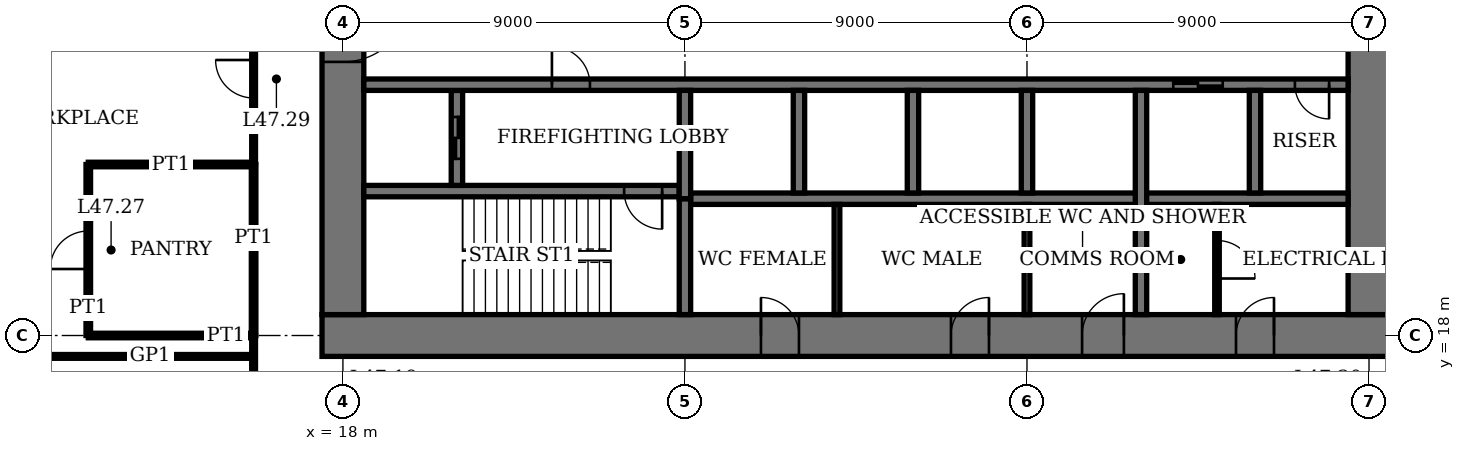
"""IFC4 building model, lengths in metres.
Left out: names, types, materials, properties, quantities, classifications, styles, units other than length and angle.
Written with IfcOpenShell. Run it as: python <this file> out.ifc"""

import sys

from ifc_helpers import new_model, si_unit, direction, frame, frame_2d, origin, place, context, subcontext, project, spatial, rectangle, extrude, element, fill, save


model = new_model("IFC4")
c1 = context("Model", 3, precision=1e-05, world=origin(), true_north=direction((0.0, 1.0)))
c2 = subcontext(c1, "Body", "Model", "MODEL_VIEW")
j1 = project(units=[si_unit("LENGTHUNIT", "METRE"), si_unit("PLANEANGLEUNIT", "RADIAN")], contexts=[c1])
p1 = place(None, origin())
s1 = spatial("IfcSite", under=j1, at=p1, CompositionType="ELEMENT")
p2 = place(p1, origin())
s2 = spatial("IfcBuilding", under=s1, at=p2, CompositionType="ELEMENT")
p3 = place(p2, frame((0.0, 0.0, 194.2)))
s3 = spatial("IfcBuildingStorey", under=s2, at=p3, CompositionType="ELEMENT", Elevation=194.2)
p4 = place(p3, frame((17.45, 18.0, 0.0), z_axis=(0.0, 0.0, 1.0), x_axis=(1.0, 0.0, 0.0)))
e1 = element("IfcWall", 1, at=p4, inside=s3, PredefinedType="SHEAR", context=c2, shape_type="SweptSolid", body=[
    extrude(rectangle(XDim=28.1, YDim=1.1, at=frame_2d((14.05, 0.0))), origin(), (0.0, 0.0, 1.0), 4.0),
])
p5 = place(p4, frame((11.55, 0.0, 0.0)))
e2 = element("IfcOpeningElement", 2, at=p5, cuts=e1, PredefinedType="OPENING", context=c2, shape_type="SweptSolid", body=[
    extrude(rectangle(XDim=1.0, YDim=2.4, at=frame_2d((0.5, 1.2))), frame((0.0, 0.56, 0.0), z_axis=(0.0, -1.0, 0.0), x_axis=(1.0, 0.0, 0.0)), (0.0, 0.0, 1.0), 1.12),
])
p6 = place(p4, frame((16.55, 0.0, 0.0)))
e3 = element("IfcOpeningElement", 3, at=p6, cuts=e1, PredefinedType="OPENING", context=c2, shape_type="SweptSolid", body=[
    extrude(rectangle(XDim=1.0, YDim=2.4, at=frame_2d((0.5, 1.2))), frame((0.0, 0.56, 0.0), z_axis=(0.0, -1.0, 0.0), x_axis=(1.0, 0.0, 0.0)), (0.0, 0.0, 1.0), 1.12),
])
p7 = place(p4, frame((20.0, 0.0, 0.0)))
e4 = element("IfcOpeningElement", 4, at=p7, cuts=e1, PredefinedType="OPENING", context=c2, shape_type="SweptSolid", body=[
    extrude(rectangle(XDim=1.1, YDim=2.4, at=frame_2d((0.55, 1.2))), frame((0.0, 0.56, 0.0), z_axis=(0.0, -1.0, 0.0), x_axis=(1.0, 0.0, 0.0)), (0.0, 0.0, 1.0), 1.12),
])
p8 = place(p4, frame((24.05, 0.0, 0.0)))
e5 = element("IfcOpeningElement", 5, at=p8, cuts=e1, PredefinedType="OPENING", context=c2, shape_type="SweptSolid", body=[
    extrude(rectangle(XDim=1.0, YDim=2.4, at=frame_2d((0.5, 1.2))), frame((0.0, 0.56, 0.0), z_axis=(0.0, -1.0, 0.0), x_axis=(1.0, 0.0, 0.0)), (0.0, 0.0, 1.0), 1.12),
])
p9 = place(p3, frame((18.0, 35.45, 0.0), z_axis=(0.0, 0.0, 1.0), x_axis=(0.0, -1.0, 0.0)))
e6 = element("IfcWall", 6, at=p9, inside=s3, PredefinedType="SHEAR", context=c2, shape_type="SweptSolid", body=[
    extrude(rectangle(XDim=16.9, YDim=1.1, at=frame_2d((8.45, 0.0))), origin(), (0.0, 0.0, 1.0), 4.0),
])
p10 = place(p9, frame((8.45, 0.0, 0.0)))
e7 = element("IfcOpeningElement", 7, at=p10, cuts=e6, PredefinedType="OPENING", context=c2, shape_type="SweptSolid", body=[
    extrude(rectangle(XDim=1.8, YDim=2.4, at=frame_2d((0.9, 1.2))), frame((0.0, 0.56, 0.0), z_axis=(0.0, -1.0, 0.0), x_axis=(1.0, 0.0, 0.0)), (0.0, 0.0, 1.0), 1.12),
])
p11 = place(p3, frame((45.0, 18.55, 0.0), z_axis=(0.0, 0.0, 1.0), x_axis=(0.0, 1.0, 0.0)))
e8 = element("IfcWall", 8, at=p11, inside=s3, PredefinedType="SHEAR", context=c2, shape_type="SweptSolid", body=[
    extrude(rectangle(XDim=16.9, YDim=1.1, at=frame_2d((8.45, 0.0))), origin(), (0.0, 0.0, 1.0), 4.0),
])
p12 = place(p11, frame((8.45, 0.0, 0.0)))
e9 = element("IfcOpeningElement", 9, at=p12, cuts=e8, PredefinedType="OPENING", context=c2, shape_type="SweptSolid", body=[
    extrude(rectangle(XDim=1.8, YDim=2.4, at=frame_2d((0.9, 1.2))), frame((0.0, 0.56, 0.0), z_axis=(0.0, -1.0, 0.0), x_axis=(1.0, 0.0, 0.0)), (0.0, 0.0, 1.0), 1.12),
])
p13 = place(p3, frame((18.55, 21.8, 0.0), z_axis=(0.0, 0.0, 1.0), x_axis=(1.0, 0.0, 0.0)))
e10 = element("IfcWall", 10, at=p13, inside=s3, PredefinedType="SHEAR", context=c2, shape_type="SweptSolid", body=[
    extrude(rectangle(XDim=8.3, YDim=0.3, at=frame_2d((4.15, 0.0))), origin(), (0.0, 0.0, 1.0), 4.0),
])
p14 = place(p13, frame((6.85, 0.0, 0.0)))
e11 = element("IfcOpeningElement", 11, at=p14, cuts=e10, PredefinedType="OPENING", context=c2, shape_type="SweptSolid", body=[
    extrude(rectangle(XDim=1.0, YDim=2.4, at=frame_2d((0.5, 1.2))), frame((0.0, 0.16, 0.0), z_axis=(0.0, -1.0, 0.0), x_axis=(1.0, 0.0, 0.0)), (0.0, 0.0, 1.0), 0.32),
])
p15 = place(p3, frame((27.0, 18.55, 0.0), z_axis=(0.0, 0.0, 1.0), x_axis=(0.0, 1.0, 0.0)))
e12 = element("IfcWall", 12, at=p15, inside=s3, PredefinedType="SHEAR", context=c2, shape_type="SweptSolid", body=[
    extrude(rectangle(XDim=3.05, YDim=0.3, at=frame_2d((1.525, 0.0))), origin(), (0.0, 0.0, 1.0), 4.0),
])
p16 = place(p3, frame((21.0, 21.95, 0.0), z_axis=(0.0, 0.0, 1.0), x_axis=(0.0, 1.0, 0.0)))
e13 = element("IfcWall", 13, at=p16, inside=s3, PredefinedType="SHEAR", context=c2, shape_type="SweptSolid", body=[
    extrude(rectangle(XDim=2.5, YDim=0.3, at=frame_2d((1.25, 0.0))), origin(), (0.0, 0.0, 1.0), 4.0),
])
p17 = place(p16, frame((0.7, 0.0, 0.0)))
e14 = element("IfcOpeningElement", 14, at=p17, cuts=e13, PredefinedType="OPENING", context=c2, shape_type="SweptSolid", body=[
    extrude(rectangle(XDim=1.1, YDim=2.4, at=frame_2d((0.55, 1.2))), frame((0.0, 0.16, 0.0), z_axis=(0.0, -1.0, 0.0), x_axis=(1.0, 0.0, 0.0)), (0.0, 0.0, 1.0), 0.32),
])
p18 = place(p3, frame((18.55, 24.6, 0.0), z_axis=(0.0, 0.0, 1.0), x_axis=(1.0, 0.0, 0.0)))
e15 = element("IfcWall", 15, at=p18, inside=s3, PredefinedType="SHEAR", context=c2, shape_type="SweptSolid", body=[
    extrude(rectangle(XDim=25.9, YDim=0.3, at=frame_2d((12.95, 0.0))), origin(), (0.0, 0.0, 1.0), 4.0),
])
p19 = place(p18, frame((4.95, 0.0, 0.0)))
e16 = element("IfcOpeningElement", 16, at=p19, cuts=e15, PredefinedType="OPENING", context=c2, shape_type="SweptSolid", body=[
    extrude(rectangle(XDim=1.0, YDim=2.4, at=frame_2d((0.5, 1.2))), frame((0.0, 0.16, 0.0), z_axis=(0.0, -1.0, 0.0), x_axis=(1.0, 0.0, 0.0)), (0.0, 0.0, 1.0), 0.32),
])
p20 = place(p18, frame((24.5, 0.0, 0.0)))
e17 = element("IfcOpeningElement", 17, at=p20, cuts=e15, PredefinedType="OPENING", context=c2, shape_type="SweptSolid", body=[
    extrude(rectangle(XDim=0.9, YDim=2.1, at=frame_2d((0.45, 1.05))), frame((0.0, 0.16, 0.0), z_axis=(0.0, -1.0, 0.0), x_axis=(1.0, 0.0, 0.0)), (0.0, 0.0, 1.0), 0.32),
])
p21 = place(p18, frame((21.3, 0.0, 0.0)))
e18 = element("IfcOpeningElement", 18, at=p21, cuts=e15, PredefinedType="OPENING", context=c2, shape_type="SweptSolid", body=[
    extrude(rectangle(XDim=1.3, YDim=2.4, at=frame_2d((0.65, 1.2))), frame((0.0, 0.16, 0.0), z_axis=(0.0, -1.0, 0.0), x_axis=(1.0, 0.0, 0.0)), (0.0, 0.0, 1.0), 0.32),
])
p22 = place(p3, frame((27.15, 21.6, 0.0), z_axis=(0.0, 0.0, 1.0), x_axis=(1.0, 0.0, 0.0)))
e19 = element("IfcWall", 19, at=p22, inside=s3, PredefinedType="SHEAR", context=c2, shape_type="SweptSolid", body=[
    extrude(rectangle(XDim=17.3, YDim=0.3, at=frame_2d((8.65, 0.0))), origin(), (0.0, 0.0, 1.0), 4.0),
])
for number, where, z_axis, x_axis in (
    (20, (30.0, 21.75, 0.0), (0.0, 0.0, 1.0), (0.0, 1.0, 0.0)),
    (21, (33.0, 21.75, 0.0), (0.0, 0.0, 1.0), (0.0, 1.0, 0.0)),
    (22, (36.0, 21.75, 0.0), (0.0, 0.0, 1.0), (0.0, 1.0, 0.0)),
):
    element("IfcWall", number, at=place(p3, frame(where, z_axis=z_axis, x_axis=x_axis)), inside=s3, PredefinedType="SHEAR", context=c2, shape_type="SweptSolid", body=[
        extrude(rectangle(XDim=2.7, YDim=0.3, at=frame_2d((1.35, 0.0))), origin(), (0.0, 0.0, 1.0), 4.0),
    ])
p23 = place(p3, frame((39.0, 18.55, 0.0), z_axis=(0.0, 0.0, 1.0), x_axis=(0.0, 1.0, 0.0)))
e23 = element("IfcWall", 23, at=p23, inside=s3, PredefinedType="SHEAR", context=c2, shape_type="SweptSolid", body=[
    extrude(rectangle(XDim=5.9, YDim=0.3, at=frame_2d((2.95, 0.0))), origin(), (0.0, 0.0, 1.0), 4.0),
])
p24 = place(p3, frame((42.0, 21.75, 0.0), z_axis=(0.0, 0.0, 1.0), x_axis=(0.0, 1.0, 0.0)))
e24 = element("IfcWall", 24, at=p24, inside=s3, PredefinedType="SHEAR", context=c2, shape_type="SweptSolid", body=[
    extrude(rectangle(XDim=2.7, YDim=0.3, at=frame_2d((1.35, 0.0))), origin(), (0.0, 0.0, 1.0), 4.0),
])
p25 = place(p3, frame((27.0, 21.6, 0.0), z_axis=(0.0, 0.0, 1.0), x_axis=(0.0, 1.0, 0.0)))
e25 = element("IfcWall", 25, at=p25, inside=s3, PredefinedType="SHEAR", context=c2, shape_type="SweptSolid", body=[
    extrude(rectangle(XDim=2.85, YDim=0.3, at=frame_2d((1.425, 0.0))), origin(), (0.0, 0.0, 1.0), 4.0),
])
p26 = place(p3, frame((9.8, 17.45, 0.0), z_axis=(0.0, 0.0, 1.0), x_axis=(1.0, 0.0, 0.0)))
e26 = element("IfcWall", 26, at=p26, inside=s3, PredefinedType="PARTITIONING", context=c2, shape_type="SweptSolid", body=[
    extrude(rectangle(XDim=5.85, YDim=0.1, at=frame_2d((2.925, 0.0))), origin(), (0.0, 0.0, 1.0), 3.75),
])
p27 = place(p3, frame((11.3, 18.0, 0.0), z_axis=(0.0, 0.0, 1.0), x_axis=(1.0, 0.0, 0.0)))
e27 = element("IfcWall", 27, at=p27, inside=s3, PredefinedType="PARTITIONING", context=c2, shape_type="SweptSolid", body=[
    extrude(rectangle(XDim=4.35, YDim=0.12, at=frame_2d((2.175, 0.0))), origin(), (0.0, 0.0, 1.0), 3.05),
])
p28 = place(p3, frame((11.3, 22.5, 0.0), z_axis=(0.0, 0.0, 1.0), x_axis=(1.0, 0.0, 0.0)))
e28 = element("IfcWall", 28, at=p28, inside=s3, PredefinedType="PARTITIONING", context=c2, shape_type="SweptSolid", body=[
    extrude(rectangle(XDim=4.35, YDim=0.12, at=frame_2d((2.175, 0.0))), origin(), (0.0, 0.0, 1.0), 3.1),
])
p29 = place(p3, frame((11.3, 18.0, 0.0), z_axis=(0.0, 0.0, 1.0), x_axis=(0.0, 1.0, 0.0)))
e29 = element("IfcWall", 29, at=p29, inside=s3, PredefinedType="PARTITIONING", context=c2, shape_type="SweptSolid", body=[
    extrude(rectangle(XDim=4.5, YDim=0.12, at=frame_2d((2.25, 0.0))), origin(), (0.0, 0.0, 1.0), 3.75),
])
p30 = place(p29, frame((1.75, 0.0, 0.0)))
e30 = element("IfcOpeningElement", 30, at=p30, cuts=e29, PredefinedType="OPENING", context=c2, shape_type="SweptSolid", body=[
    extrude(rectangle(XDim=1.0, YDim=2.4, at=frame_2d((0.5, 1.2))), frame((0.0, 0.07, 0.0), z_axis=(0.0, -1.0, 0.0), x_axis=(1.0, 0.0, 0.0)), (0.0, 0.0, 1.0), 0.14),
])
p31 = place(p3, frame((15.65, 18.0, 0.0), z_axis=(0.0, 0.0, 1.0), x_axis=(0.0, 1.0, 0.0)))
e31 = element("IfcWall", 31, at=p31, inside=s3, PredefinedType="PARTITIONING", context=c2, shape_type="SweptSolid", body=[
    extrude(rectangle(XDim=4.5, YDim=0.12, at=frame_2d((2.25, 0.0))), origin(), (0.0, 0.0, 1.0), 3.75),
])
p32 = place(p3, frame((15.65, 15.65, 0.0), z_axis=(0.0, 0.0, 1.0), x_axis=(0.0, 1.0, 0.0)))
e32 = element("IfcWall", 32, at=p32, inside=s3, PredefinedType="PARTITIONING", context=c2, shape_type="SweptSolid", body=[
    extrude(rectangle(XDim=2.35, YDim=0.1, at=frame_2d((1.175, 0.0))), origin(), (0.0, 0.0, 1.0), 3.75),
])
p33 = place(p3, frame((15.65, 22.5, 0.0), z_axis=(0.0, 0.0, 1.0), x_axis=(0.0, 1.0, 0.0)))
e33 = element("IfcWall", 33, at=p33, inside=s3, PredefinedType="PARTITIONING", context=c2, shape_type="SweptSolid", body=[
    extrude(rectangle(XDim=4.5, YDim=0.1, at=frame_2d((2.25, 0.0))), origin(), (0.0, 0.0, 1.0), 3.75),
])
p34 = place(p33, frame((1.75, 0.0, 0.0)))
e34 = element("IfcOpeningElement", 34, at=p34, cuts=e33, PredefinedType="OPENING", context=c2, shape_type="SweptSolid", body=[
    extrude(rectangle(XDim=1.0, YDim=2.4, at=frame_2d((0.5, 1.2))), frame((0.0, 0.06, 0.0), z_axis=(0.0, -1.0, 0.0), x_axis=(1.0, 0.0, 0.0)), (0.0, 0.0, 1.0), 0.12),
])
for number, where, z_axis, x_axis in (
    (35, (31.0, 18.55, 0.0), (0.0, 0.0, 1.0), (0.0, 1.0, 0.0)),
    (36, (36.0, 18.55, 0.0), (0.0, 0.0, 1.0), (0.0, 1.0, 0.0)),
):
    element("IfcWall", number, at=place(p3, frame(where, z_axis=z_axis, x_axis=x_axis)), inside=s3, PredefinedType="PARTITIONING", context=c2, shape_type="SweptSolid", body=[
        extrude(rectangle(XDim=2.9, YDim=0.15, at=frame_2d((1.45, 0.0))), origin(), (0.0, 0.0, 1.0), 3.75),
    ])
p35 = place(p3, frame((41.0, 18.55, 0.0), z_axis=(0.0, 0.0, 1.0), x_axis=(0.0, 1.0, 0.0)))
e37 = element("IfcWall", 37, at=p35, inside=s3, PredefinedType="PARTITIONING", context=c2, shape_type="SweptSolid", body=[
    extrude(rectangle(XDim=2.9, YDim=0.12, at=frame_2d((1.45, 0.0))), origin(), (0.0, 0.0, 1.0), 3.75),
])
p36 = place(p35, frame((0.95, 0.0, 0.0)))
e38 = element("IfcOpeningElement", 38, at=p36, cuts=e37, PredefinedType="OPENING", context=c2, shape_type="SweptSolid", body=[
    extrude(rectangle(XDim=1.0, YDim=2.4, at=frame_2d((0.5, 1.2))), frame((0.0, 0.07, 0.0), z_axis=(0.0, -1.0, 0.0), x_axis=(1.0, 0.0, 0.0)), (0.0, 0.0, 1.0), 0.14),
])
p37 = place(p10, origin())
e39 = element("IfcDoor", 39, at=p37, inside=s3, OperationType="DOUBLE_DOOR_DOUBLE_SWING", PredefinedType="DOOR", context=c2, shape_type="SweptSolid", body=[
    extrude(rectangle(XDim=1.8, YDim=2.4, at=frame_2d((0.9, 1.2))), frame((0.0, 0.03, 0.0), z_axis=(0.0, -1.0, 0.0), x_axis=(1.0, 0.0, 0.0)), (0.0, 0.0, 1.0), 0.06),
    extrude(rectangle(XDim=0.04, YDim=2.4, at=frame_2d((0.02, 1.2))), frame((0.0, 0.55, 0.0), z_axis=(0.0, -1.0, 0.0), x_axis=(1.0, 0.0, 0.0)), (0.0, 0.0, 1.0), 1.1),
    extrude(rectangle(XDim=0.04, YDim=2.4, at=frame_2d((1.78, 1.2))), frame((0.0, 0.55, 0.0), z_axis=(0.0, -1.0, 0.0), x_axis=(1.0, 0.0, 0.0)), (0.0, 0.0, 1.0), 1.1),
    extrude(rectangle(XDim=1.8, YDim=0.04, at=frame_2d((0.9, 2.38))), frame((0.0, 0.55, 0.0), z_axis=(0.0, -1.0, 0.0), x_axis=(1.0, 0.0, 0.0)), (0.0, 0.0, 1.0), 1.1),
])
fill(e7, e39)
p38 = place(p5, origin())
e40 = element("IfcDoor", 40, at=p38, inside=s3, OperationType="SINGLE_SWING_RIGHT", PredefinedType="DOOR", context=c2, shape_type="SweptSolid", body=[
    extrude(rectangle(XDim=1.0, YDim=2.4, at=frame_2d((0.5, 1.2))), frame((0.0, 0.025, 0.0), z_axis=(0.0, -1.0, 0.0), x_axis=(1.0, 0.0, 0.0)), (0.0, 0.0, 1.0), 0.05),
    extrude(rectangle(XDim=0.04, YDim=2.4, at=frame_2d((0.02, 1.2))), frame((0.0, 0.4, 0.0), z_axis=(0.0, -1.0, 0.0), x_axis=(1.0, 0.0, 0.0)), (0.0, 0.0, 1.0), 0.8),
    extrude(rectangle(XDim=0.04, YDim=2.4, at=frame_2d((0.98, 1.2))), frame((0.0, 0.4, 0.0), z_axis=(0.0, -1.0, 0.0), x_axis=(1.0, 0.0, 0.0)), (0.0, 0.0, 1.0), 0.8),
    extrude(rectangle(XDim=1.0, YDim=0.04, at=frame_2d((0.5, 2.38))), frame((0.0, 0.4, 0.0), z_axis=(0.0, -1.0, 0.0), x_axis=(1.0, 0.0, 0.0)), (0.0, 0.0, 1.0), 0.8),
])
fill(e2, e40)
p39 = place(p6, origin())
e41 = element("IfcDoor", 41, at=p39, inside=s3, OperationType="SINGLE_SWING_LEFT", PredefinedType="DOOR", context=c2, shape_type="SweptSolid", body=[
    extrude(rectangle(XDim=1.0, YDim=2.4, at=frame_2d((0.5, 1.2))), frame((0.0, 0.025, 0.0), z_axis=(0.0, -1.0, 0.0), x_axis=(1.0, 0.0, 0.0)), (0.0, 0.0, 1.0), 0.05),
    extrude(rectangle(XDim=0.04, YDim=2.4, at=frame_2d((0.02, 1.2))), frame((0.0, 0.4, 0.0), z_axis=(0.0, -1.0, 0.0), x_axis=(1.0, 0.0, 0.0)), (0.0, 0.0, 1.0), 0.8),
    extrude(rectangle(XDim=0.04, YDim=2.4, at=frame_2d((0.98, 1.2))), frame((0.0, 0.4, 0.0), z_axis=(0.0, -1.0, 0.0), x_axis=(1.0, 0.0, 0.0)), (0.0, 0.0, 1.0), 0.8),
    extrude(rectangle(XDim=1.0, YDim=0.04, at=frame_2d((0.5, 2.38))), frame((0.0, 0.4, 0.0), z_axis=(0.0, -1.0, 0.0), x_axis=(1.0, 0.0, 0.0)), (0.0, 0.0, 1.0), 0.8),
])
fill(e3, e41)
p40 = place(p7, origin())
e42 = element("IfcDoor", 42, at=p40, inside=s3, OperationType="SINGLE_SWING_LEFT", PredefinedType="DOOR", context=c2, shape_type="SweptSolid", body=[
    extrude(rectangle(XDim=1.1, YDim=2.4, at=frame_2d((0.55, 1.2))), frame((0.0, 0.025, 0.0), z_axis=(0.0, -1.0, 0.0), x_axis=(1.0, 0.0, 0.0)), (0.0, 0.0, 1.0), 0.05),
    extrude(rectangle(XDim=0.04, YDim=2.4, at=frame_2d((0.02, 1.2))), frame((0.0, 0.44, 0.0), z_axis=(0.0, -1.0, 0.0), x_axis=(1.0, 0.0, 0.0)), (0.0, 0.0, 1.0), 0.88),
    extrude(rectangle(XDim=0.04, YDim=2.4, at=frame_2d((1.08, 1.2))), frame((0.0, 0.44, 0.0), z_axis=(0.0, -1.0, 0.0), x_axis=(1.0, 0.0, 0.0)), (0.0, 0.0, 1.0), 0.88),
    extrude(rectangle(XDim=1.1, YDim=0.04, at=frame_2d((0.55, 2.38))), frame((0.0, 0.44, 0.0), z_axis=(0.0, -1.0, 0.0), x_axis=(1.0, 0.0, 0.0)), (0.0, 0.0, 1.0), 0.88),
])
fill(e4, e42)
p41 = place(p8, origin())
e43 = element("IfcDoor", 43, at=p41, inside=s3, OperationType="SINGLE_SWING_LEFT", PredefinedType="DOOR", context=c2, shape_type="SweptSolid", body=[
    extrude(rectangle(XDim=1.0, YDim=2.4, at=frame_2d((0.5, 1.2))), frame((0.0, 0.025, 0.0), z_axis=(0.0, -1.0, 0.0), x_axis=(1.0, 0.0, 0.0)), (0.0, 0.0, 1.0), 0.05),
    extrude(rectangle(XDim=0.04, YDim=2.4, at=frame_2d((0.02, 1.2))), frame((0.0, 0.4, 0.0), z_axis=(0.0, -1.0, 0.0), x_axis=(1.0, 0.0, 0.0)), (0.0, 0.0, 1.0), 0.8),
    extrude(rectangle(XDim=0.04, YDim=2.4, at=frame_2d((0.98, 1.2))), frame((0.0, 0.4, 0.0), z_axis=(0.0, -1.0, 0.0), x_axis=(1.0, 0.0, 0.0)), (0.0, 0.0, 1.0), 0.8),
    extrude(rectangle(XDim=1.0, YDim=0.04, at=frame_2d((0.5, 2.38))), frame((0.0, 0.4, 0.0), z_axis=(0.0, -1.0, 0.0), x_axis=(1.0, 0.0, 0.0)), (0.0, 0.0, 1.0), 0.8),
])
fill(e5, e43)
p42 = place(p14, origin())
e44 = element("IfcDoor", 44, at=p42, inside=s3, OperationType="SINGLE_SWING_RIGHT", PredefinedType="DOOR", context=c2, shape_type="SweptSolid", body=[
    extrude(rectangle(XDim=1.0, YDim=2.4, at=frame_2d((0.5, 1.2))), frame((0.0, 0.03, 0.0), z_axis=(0.0, -1.0, 0.0), x_axis=(1.0, 0.0, 0.0)), (0.0, 0.0, 1.0), 0.06),
])
fill(e11, e44)
p43 = place(p19, origin())
e45 = element("IfcDoor", 45, at=p43, inside=s3, OperationType="SINGLE_SWING_RIGHT", PredefinedType="DOOR", context=c2, shape_type="SweptSolid", body=[
    extrude(rectangle(XDim=1.0, YDim=2.4, at=frame_2d((0.5, 1.2))), frame((0.0, 0.03, 0.0), z_axis=(0.0, -1.0, 0.0), x_axis=(1.0, 0.0, 0.0)), (0.0, 0.0, 1.0), 0.06),
])
fill(e16, e45)
p44 = place(p20, origin())
e46 = element("IfcDoor", 46, at=p44, inside=s3, OperationType="SINGLE_SWING_RIGHT", PredefinedType="DOOR", context=c2, shape_type="SweptSolid", body=[
    extrude(rectangle(XDim=0.9, YDim=2.1, at=frame_2d((0.45, 1.05))), frame((0.0, 0.03, 0.0), z_axis=(0.0, -1.0, 0.0), x_axis=(1.0, 0.0, 0.0)), (0.0, 0.0, 1.0), 0.06),
])
fill(e17, e46)
p45 = place(p30, origin())
e47 = element("IfcDoor", 47, at=p45, inside=s3, OperationType="SINGLE_SWING_RIGHT", PredefinedType="DOOR", context=c2, shape_type="SweptSolid", body=[
    extrude(rectangle(XDim=1.0, YDim=2.4, at=frame_2d((0.5, 1.2))), frame((0.0, 0.025, 0.0), z_axis=(0.0, -1.0, 0.0), x_axis=(1.0, 0.0, 0.0)), (0.0, 0.0, 1.0), 0.05),
])
fill(e30, e47)
p46 = place(p34, origin())
e48 = element("IfcDoor", 48, at=p46, inside=s3, OperationType="SINGLE_SWING_LEFT", PredefinedType="DOOR", context=c2, shape_type="SweptSolid", body=[
    extrude(rectangle(XDim=1.0, YDim=2.4, at=frame_2d((0.5, 1.2))), frame((0.0, 0.02, 0.0), z_axis=(0.0, -1.0, 0.0), x_axis=(1.0, 0.0, 0.0)), (0.0, 0.0, 1.0), 0.04),
])
fill(e34, e48)
p47 = place(p36, origin())
e49 = element("IfcDoor", 49, at=p47, inside=s3, OperationType="SINGLE_SWING_LEFT", PredefinedType="DOOR", context=c2, shape_type="SweptSolid", body=[
    extrude(rectangle(XDim=1.0, YDim=2.4, at=frame_2d((0.5, 1.2))), frame((0.0, 0.03, 0.0), z_axis=(0.0, -1.0, 0.0), x_axis=(1.0, 0.0, 0.0)), (0.0, 0.0, 1.0), 0.06),
])
fill(e38, e49)
p48 = place(p21, origin())
e50 = element("IfcDoor", 50, at=p48, inside=s3, OperationType="DOUBLE_DOOR_SLIDING", PredefinedType="DOOR", context=c2, shape_type="SweptSolid", body=[
    extrude(rectangle(XDim=1.3, YDim=2.4, at=frame_2d((0.65, 1.2))), frame((0.0, 0.02, 0.0), z_axis=(0.0, -1.0, 0.0), x_axis=(1.0, 0.0, 0.0)), (0.0, 0.0, 1.0), 0.04),
])
fill(e18, e50)
p49 = place(p17, origin())
e51 = element("IfcDoor", 51, at=p49, inside=s3, OperationType="DOUBLE_DOOR_SLIDING", PredefinedType="DOOR", context=c2, shape_type="SweptSolid", body=[
    extrude(rectangle(XDim=1.1, YDim=2.4, at=frame_2d((0.55, 1.2))), frame((0.0, 0.03, 0.0), z_axis=(0.0, -1.0, 0.0), x_axis=(1.0, 0.0, 0.0)), (0.0, 0.0, 1.0), 0.06),
])
fill(e14, e51)
save(model, sys.argv[1])
